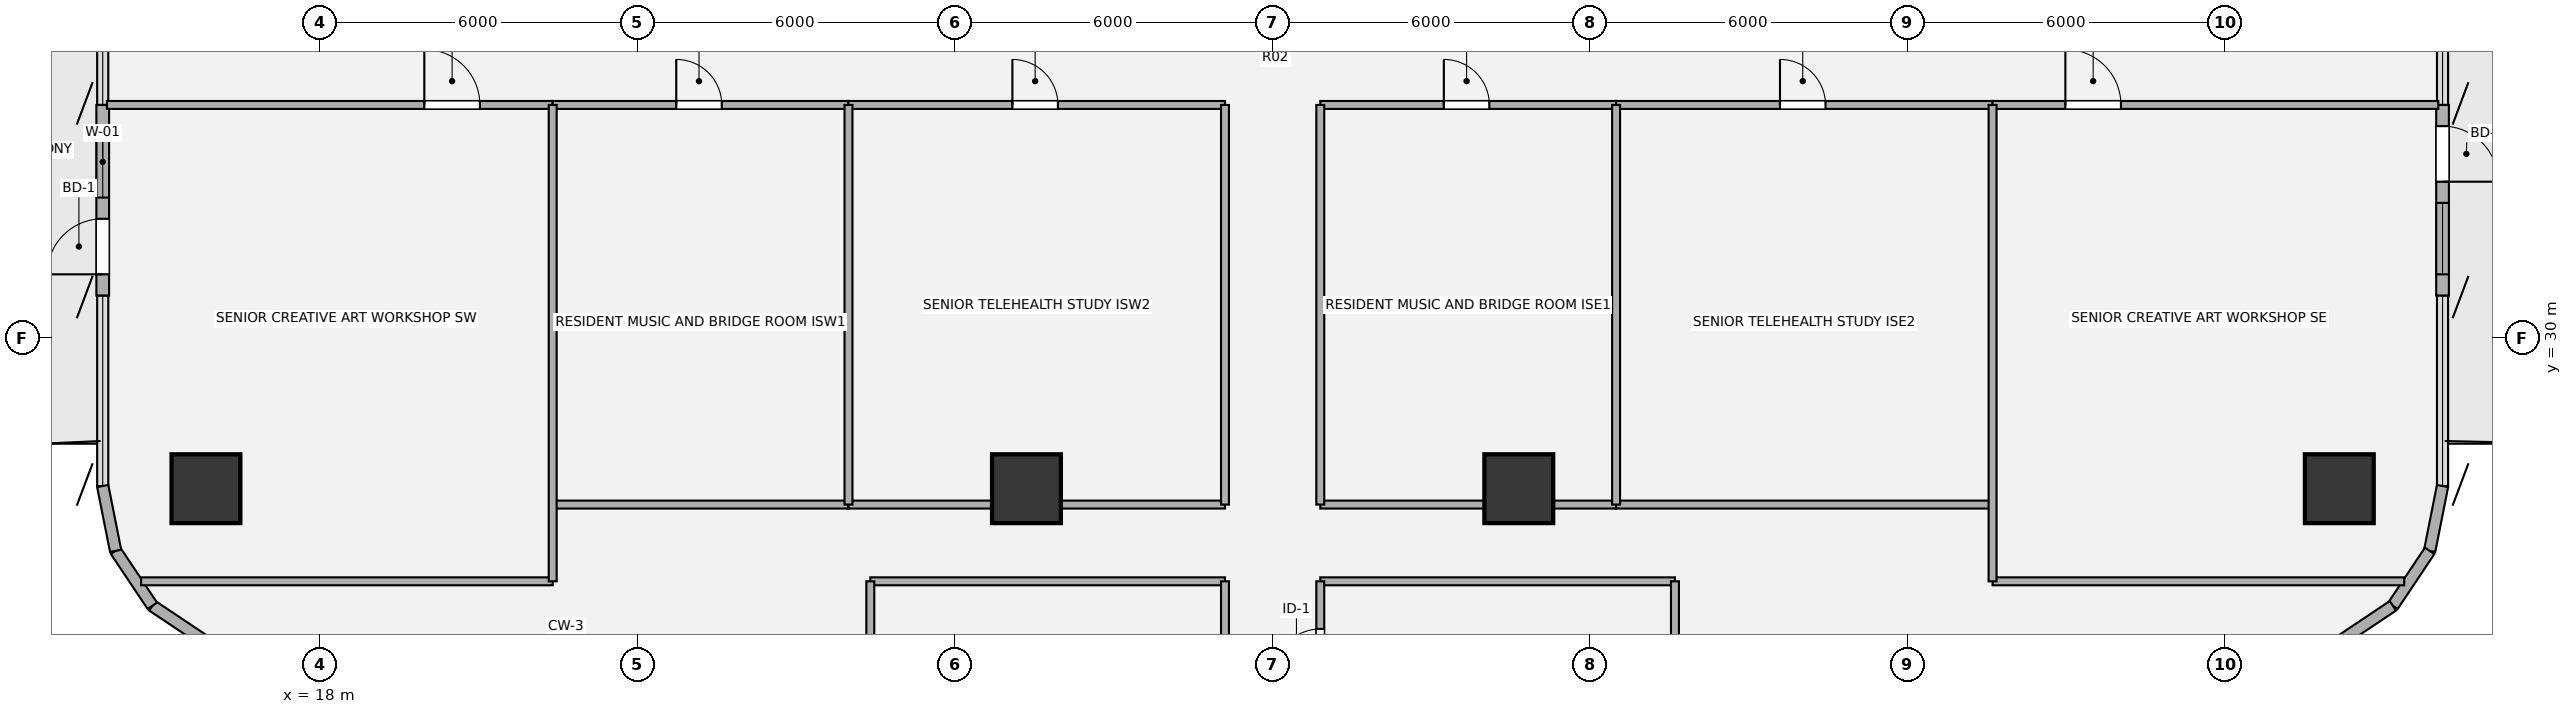
"""IFC4 building model, lengths in metres.
Left out: names, types, materials, properties, quantities, classifications, styles, units other than length and angle.
Written with IfcOpenShell. Run it as: python <this file> out.ifc"""

import sys

from ifc_helpers import new_model, si_unit, direction, frame, frame_2d, origin, origin_2d, place, context, subcontext, project, spatial, rectangle, hollow_circle, extrude, source, transform, mapped, element, fill, save


model = new_model("IFC4")
c1 = context("Model", 3, precision=1e-05, world=origin(), true_north=direction((0.0, 1.0)))
c2 = subcontext(c1, "Body", "Model", "MODEL_VIEW")
j1 = project(units=[si_unit("LENGTHUNIT", "METRE"), si_unit("PLANEANGLEUNIT", "RADIAN")], contexts=[c1])
p1 = place(None, origin())
s1 = spatial("IfcSite", under=j1, at=p1, CompositionType="ELEMENT")
p2 = place(p1, origin())
s2 = spatial("IfcBuilding", under=s1, at=p2, CompositionType="ELEMENT")
p3 = place(p2, frame((0.0, 0.0, 123.84)))
s3 = spatial("IfcBuildingStorey", under=s2, at=p3, CompositionType="ELEMENT", Elevation=123.84)
m1 = source(origin(), c2, "Body", "SweptSolid", [
    extrude(hollow_circle(Radius=0.65, WallThickness=0.045, at=origin_2d()), origin(), (0.0, 0.0, 1.0), 3.78),
])
for number, where, z_axis, x_axis in (
    (1, (15.85, 27.15, 0.0), (0.0, 0.0, 1.0), (1.0, 0.0, 0.0)),
    (2, (56.15, 27.15, 0.0), (0.0, 0.0, 1.0), (1.0, 0.0, 0.0)),
    (3, (31.35, 27.15, 0.0), (0.0, 0.0, 1.0), (1.0, 0.0, 0.0)),
    (4, (40.65, 27.15, 0.0), (0.0, 0.0, 1.0), (1.0, 0.0, 0.0)),
):
    element("IfcColumn", number, at=place(p3, frame(where, z_axis=z_axis, x_axis=x_axis)), inside=s3, PredefinedType="COLUMN", context=c2, shape_type="MappedRepresentation", body=[
        mapped(m1, transform((0.0, 0.0, 0.0), x_axis=(1.0, 0.0, 0.0), y_axis=(0.0, 1.0, 0.0), z_axis=(0.0, 0.0, 1.0), scale=1.0)),
    ])
for number, where, z_axis, x_axis in (
    (5, (15.875, 24.244, 0.0), (0.0, 0.0, 1.0), (-0.831, 0.556, 0.0)),
    (6, (14.837, 24.937, 0.0), (0.0, 0.0, 1.0), (-0.556, 0.831, 0.0)),
    (7, (14.144, 25.975, 0.0), (0.0, 0.0, 1.0), (-0.195, 0.981, 0.0)),
):
    element("IfcWall", number, at=place(p3, frame(where, z_axis=z_axis, x_axis=x_axis)), inside=s3, PredefinedType="SOLIDWALL", context=c2, shape_type="SweptSolid", body=[
        extrude(rectangle(XDim=1.249, YDim=0.215, at=frame_2d((0.624, 0.0))), origin(), (0.0, 0.0, 1.0), 3.53),
    ])
p4 = place(p3, frame((13.9, 30.8, 0.0), z_axis=(0.0, 0.0, 1.0), x_axis=(0.0, 1.0, 0.0)))
e8 = element("IfcWall", 8, at=p4, inside=s3, PredefinedType="SOLIDWALL", context=c2, shape_type="SweptSolid", body=[
    extrude(rectangle(XDim=3.6, YDim=0.24, at=frame_2d((1.8, 0.0))), origin(), (0.0, 0.0, 1.0), 3.53),
])
p5 = place(p4, frame((0.4, 0.0, 0.0)))
e9 = element("IfcOpeningElement", 9, at=p5, cuts=e8, PredefinedType="OPENING", context=c2, shape_type="SweptSolid", body=[
    extrude(rectangle(XDim=1.05, YDim=2.15, at=origin_2d()), frame((0.525, 0.13, 1.075), z_axis=(0.0, -1.0, 0.0), x_axis=(1.0, 0.0, 0.0)), (0.0, 0.0, 1.0), 0.26),
])
p6 = place(p4, frame((1.85, 0.0, 0.85)))
e10 = element("IfcOpeningElement", 10, at=p6, cuts=e8, PredefinedType="OPENING", context=c2, shape_type="SweptSolid", body=[
    extrude(rectangle(XDim=1.35, YDim=1.35, at=origin_2d()), frame((0.675, 0.13, 0.675), z_axis=(0.0, -1.0, 0.0), x_axis=(1.0, 0.0, 0.0)), (0.0, 0.0, 1.0), 0.26),
])
p7 = place(p3, frame((58.1, 34.4, 0.0), z_axis=(0.0, 0.0, 1.0), x_axis=(0.0, -1.0, 0.0)))
e11 = element("IfcWall", 11, at=p7, inside=s3, PredefinedType="SOLIDWALL", context=c2, shape_type="SweptSolid", body=[
    extrude(rectangle(XDim=3.6, YDim=0.24, at=frame_2d((1.8, 0.0))), origin(), (0.0, 0.0, 1.0), 3.53),
])
p8 = place(p7, frame((0.4, 0.0, 0.0)))
e12 = element("IfcOpeningElement", 12, at=p8, cuts=e11, PredefinedType="OPENING", context=c2, shape_type="SweptSolid", body=[
    extrude(rectangle(XDim=1.05, YDim=2.15, at=origin_2d()), frame((0.525, 0.13, 1.075), z_axis=(0.0, -1.0, 0.0), x_axis=(1.0, 0.0, 0.0)), (0.0, 0.0, 1.0), 0.26),
])
p9 = place(p7, frame((1.85, 0.0, 0.85)))
e13 = element("IfcOpeningElement", 13, at=p9, cuts=e11, PredefinedType="OPENING", context=c2, shape_type="SweptSolid", body=[
    extrude(rectangle(XDim=1.35, YDim=1.35, at=origin_2d()), frame((0.675, 0.13, 0.675), z_axis=(0.0, -1.0, 0.0), x_axis=(1.0, 0.0, 0.0)), (0.0, 0.0, 1.0), 0.26),
])
for number, where, z_axis, x_axis in (
    (14, (58.1, 27.2, 0.0), (0.0, 0.0, 1.0), (-0.195, -0.981, 0.0)),
    (15, (57.856, 25.975, 0.0), (0.0, 0.0, 1.0), (-0.556, -0.831, 0.0)),
    (16, (57.163, 24.937, 0.0), (0.0, 0.0, 1.0), (-0.831, -0.556, 0.0)),
):
    element("IfcWall", number, at=place(p3, frame(where, z_axis=z_axis, x_axis=x_axis)), inside=s3, PredefinedType="SOLIDWALL", context=c2, shape_type="SweptSolid", body=[
        extrude(rectangle(XDim=1.249, YDim=0.215, at=frame_2d((0.624, 0.0))), origin(), (0.0, 0.0, 1.0), 3.53),
    ])
p10 = place(p3, frame((14.624, 25.4, 0.0), z_axis=(0.0, 0.0, 1.0), x_axis=(1.0, 0.0, 0.0)))
e17 = element("IfcWall", 17, at=p10, inside=s3, PredefinedType="PARTITIONING", context=c2, shape_type="SweptSolid", body=[
    extrude(rectangle(XDim=7.776, YDim=0.15, at=frame_2d((3.888, 0.0))), origin(), (0.0, 0.0, 1.0), 3.5),
])
for number, where, z_axis, x_axis in (
    (18, (28.4, 25.4, 0.0), (0.0, 0.0, 1.0), (1.0, 0.0, 0.0)),
    (19, (36.9, 25.4, 0.0), (0.0, 0.0, 1.0), (1.0, 0.0, 0.0)),
):
    element("IfcWall", number, at=place(p3, frame(where, z_axis=z_axis, x_axis=x_axis)), inside=s3, PredefinedType="PARTITIONING", context=c2, shape_type="SweptSolid", body=[
        extrude(rectangle(XDim=6.7, YDim=0.15, at=frame_2d((3.35, 0.0))), origin(), (0.0, 0.0, 1.0), 3.5),
    ])
p11 = place(p3, frame((49.6, 25.4, 0.0), z_axis=(0.0, 0.0, 1.0), x_axis=(1.0, 0.0, 0.0)))
e20 = element("IfcWall", 20, at=p11, inside=s3, PredefinedType="PARTITIONING", context=c2, shape_type="SweptSolid", body=[
    extrude(rectangle(XDim=7.776, YDim=0.15, at=frame_2d((3.888, 0.0))), origin(), (0.0, 0.0, 1.0), 3.5),
])
p12 = place(p3, frame((22.4, 26.85, 0.0), z_axis=(0.0, 0.0, 1.0), x_axis=(1.0, 0.0, 0.0)))
e21 = element("IfcWall", 21, at=p12, inside=s3, PredefinedType="PARTITIONING", context=c2, shape_type="SweptSolid", body=[
    extrude(rectangle(XDim=5.588, YDim=0.15, at=frame_2d((2.794, 0.0))), origin(), (0.0, 0.0, 1.0), 3.055),
])
p13 = place(p3, frame((27.988, 26.85, 0.0), z_axis=(0.0, 0.0, 1.0), x_axis=(1.0, 0.0, 0.0)))
e22 = element("IfcWall", 22, at=p13, inside=s3, PredefinedType="PARTITIONING", context=c2, shape_type="SweptSolid", body=[
    extrude(rectangle(XDim=7.112, YDim=0.15, at=frame_2d((3.556, 0.0))), origin(), (0.0, 0.0, 1.0), 2.903),
])
p14 = place(p3, frame((36.9, 26.85, 0.0), z_axis=(0.0, 0.0, 1.0), x_axis=(1.0, 0.0, 0.0)))
e23 = element("IfcWall", 23, at=p14, inside=s3, PredefinedType="PARTITIONING", context=c2, shape_type="SweptSolid", body=[
    extrude(rectangle(XDim=5.588, YDim=0.15, at=frame_2d((2.794, 0.0))), origin(), (0.0, 0.0, 1.0), 2.903),
])
p15 = place(p3, frame((42.488, 26.85, 0.0), z_axis=(0.0, 0.0, 1.0), x_axis=(1.0, 0.0, 0.0)))
e24 = element("IfcWall", 24, at=p15, inside=s3, PredefinedType="PARTITIONING", context=c2, shape_type="SweptSolid", body=[
    extrude(rectangle(XDim=7.112, YDim=0.15, at=frame_2d((3.556, 0.0))), origin(), (0.0, 0.0, 1.0), 3.055),
])
p16 = place(p3, frame((13.98, 34.4, 0.0), z_axis=(0.0, 0.0, 1.0), x_axis=(1.0, 0.0, 0.0)))
e25 = element("IfcWall", 25, at=p16, inside=s3, PredefinedType="PARTITIONING", context=c2, shape_type="SweptSolid", body=[
    extrude(rectangle(XDim=8.42, YDim=0.15, at=frame_2d((4.21, 0.0))), origin(), (0.0, 0.0, 1.0), 2.982),
])
p17 = place(p16, frame((5.995, 0.0, 0.0)))
e26 = element("IfcOpeningElement", 26, at=p17, cuts=e25, PredefinedType="OPENING", context=c2, shape_type="SweptSolid", body=[
    extrude(rectangle(XDim=1.05, YDim=2.1, at=origin_2d()), frame((0.525, 0.085, 1.05), z_axis=(0.0, -1.0, 0.0), x_axis=(1.0, 0.0, 0.0)), (0.0, 0.0, 1.0), 0.17),
])
p18 = place(p3, frame((22.4, 34.4, 0.0), z_axis=(0.0, 0.0, 1.0), x_axis=(1.0, 0.0, 0.0)))
e27 = element("IfcWall", 27, at=p18, inside=s3, PredefinedType="PARTITIONING", context=c2, shape_type="SweptSolid", body=[
    extrude(rectangle(XDim=5.588, YDim=0.15, at=frame_2d((2.794, 0.0))), origin(), (0.0, 0.0, 1.0), 2.982),
])
p19 = place(p18, frame((2.334, 0.0, 0.0)))
e28 = element("IfcOpeningElement", 28, at=p19, cuts=e27, PredefinedType="OPENING", context=c2, shape_type="SweptSolid", body=[
    extrude(rectangle(XDim=0.86, YDim=2.1, at=origin_2d()), frame((0.43, 0.085, 1.05), z_axis=(0.0, -1.0, 0.0), x_axis=(1.0, 0.0, 0.0)), (0.0, 0.0, 1.0), 0.17),
])
p20 = place(p3, frame((27.988, 34.4, 0.0), z_axis=(0.0, 0.0, 1.0), x_axis=(1.0, 0.0, 0.0)))
e29 = element("IfcWall", 29, at=p20, inside=s3, PredefinedType="PARTITIONING", context=c2, shape_type="SweptSolid", body=[
    extrude(rectangle(XDim=7.112, YDim=0.15, at=frame_2d((3.556, 0.0))), origin(), (0.0, 0.0, 1.0), 2.982),
])
p21 = place(p20, frame((3.096, 0.0, 0.0)))
e30 = element("IfcOpeningElement", 30, at=p21, cuts=e29, PredefinedType="OPENING", context=c2, shape_type="SweptSolid", body=[
    extrude(rectangle(XDim=0.86, YDim=2.1, at=origin_2d()), frame((0.43, 0.085, 1.05), z_axis=(0.0, -1.0, 0.0), x_axis=(1.0, 0.0, 0.0)), (0.0, 0.0, 1.0), 0.17),
])
p22 = place(p3, frame((36.9, 34.4, 0.0), z_axis=(0.0, 0.0, 1.0), x_axis=(1.0, 0.0, 0.0)))
e31 = element("IfcWall", 31, at=p22, inside=s3, PredefinedType="PARTITIONING", context=c2, shape_type="SweptSolid", body=[
    extrude(rectangle(XDim=5.588, YDim=0.15, at=frame_2d((2.794, 0.0))), origin(), (0.0, 0.0, 1.0), 2.982),
])
p23 = place(p22, frame((2.334, 0.0, 0.0)))
e32 = element("IfcOpeningElement", 32, at=p23, cuts=e31, PredefinedType="OPENING", context=c2, shape_type="SweptSolid", body=[
    extrude(rectangle(XDim=0.86, YDim=2.1, at=origin_2d()), frame((0.43, 0.085, 1.05), z_axis=(0.0, -1.0, 0.0), x_axis=(1.0, 0.0, 0.0)), (0.0, 0.0, 1.0), 0.17),
])
p24 = place(p3, frame((42.488, 34.4, 0.0), z_axis=(0.0, 0.0, 1.0), x_axis=(1.0, 0.0, 0.0)))
e33 = element("IfcWall", 33, at=p24, inside=s3, PredefinedType="PARTITIONING", context=c2, shape_type="SweptSolid", body=[
    extrude(rectangle(XDim=7.112, YDim=0.15, at=frame_2d((3.556, 0.0))), origin(), (0.0, 0.0, 1.0), 2.982),
])
p25 = place(p24, frame((3.096, 0.0, 0.0)))
e34 = element("IfcOpeningElement", 34, at=p25, cuts=e33, PredefinedType="OPENING", context=c2, shape_type="SweptSolid", body=[
    extrude(rectangle(XDim=0.86, YDim=2.1, at=origin_2d()), frame((0.43, 0.085, 1.05), z_axis=(0.0, -1.0, 0.0), x_axis=(1.0, 0.0, 0.0)), (0.0, 0.0, 1.0), 0.17),
])
p26 = place(p3, frame((49.6, 34.4, 0.0), z_axis=(0.0, 0.0, 1.0), x_axis=(1.0, 0.0, 0.0)))
e35 = element("IfcWall", 35, at=p26, inside=s3, PredefinedType="PARTITIONING", context=c2, shape_type="SweptSolid", body=[
    extrude(rectangle(XDim=8.42, YDim=0.15, at=frame_2d((4.21, 0.0))), origin(), (0.0, 0.0, 1.0), 2.982),
])
p27 = place(p26, frame((1.375, 0.0, 0.0)))
e36 = element("IfcOpeningElement", 36, at=p27, cuts=e35, PredefinedType="OPENING", context=c2, shape_type="SweptSolid", body=[
    extrude(rectangle(XDim=1.05, YDim=2.1, at=origin_2d()), frame((0.525, 0.085, 1.05), z_axis=(0.0, -1.0, 0.0), x_axis=(1.0, 0.0, 0.0)), (0.0, 0.0, 1.0), 0.17),
])
p28 = place(p3, frame((22.4, 25.4, 0.0), z_axis=(0.0, 0.0, 1.0), x_axis=(0.0, 1.0, 0.0)))
e37 = element("IfcWall", 37, at=p28, inside=s3, PredefinedType="PARTITIONING", context=c2, shape_type="SweptSolid", body=[
    extrude(rectangle(XDim=9.0, YDim=0.15, at=frame_2d((4.5, 0.0))), origin(), (0.0, 0.0, 1.0), 3.5),
])
p29 = place(p3, frame((27.988, 26.85, 0.0), z_axis=(0.0, 0.0, 1.0), x_axis=(0.0, 1.0, 0.0)))
e38 = element("IfcWall", 38, at=p29, inside=s3, PredefinedType="PARTITIONING", context=c2, shape_type="SweptSolid", body=[
    extrude(rectangle(XDim=7.55, YDim=0.15, at=frame_2d((3.775, 0.0))), origin(), (0.0, 0.0, 1.0), 3.5),
])
p30 = place(p3, frame((28.4, 21.957, 0.0), z_axis=(0.0, 0.0, 1.0), x_axis=(0.0, 1.0, 0.0)))
e39 = element("IfcWall", 39, at=p30, inside=s3, PredefinedType="PARTITIONING", context=c2, shape_type="SweptSolid", body=[
    extrude(rectangle(XDim=3.443, YDim=0.15, at=frame_2d((1.721, 0.0))), origin(), (0.0, 0.0, 1.0), 3.5),
])
p31 = place(p3, frame((35.1, 20.2, 0.0), z_axis=(0.0, 0.0, 1.0), x_axis=(0.0, 1.0, 0.0)))
e40 = element("IfcWall", 40, at=p31, inside=s3, PredefinedType="PARTITIONING", context=c2, shape_type="SweptSolid", body=[
    extrude(rectangle(XDim=5.2, YDim=0.15, at=frame_2d((2.6, 0.0))), origin(), (0.0, 0.0, 1.0), 3.5),
])
p32 = place(p31, frame((2.175, 0.0, 0.0)))
e41 = element("IfcOpeningElement", 41, at=p32, cuts=e40, PredefinedType="OPENING", context=c2, shape_type="SweptSolid", body=[
    extrude(rectangle(XDim=1.05, YDim=2.1, at=origin_2d()), frame((0.525, 0.085, 1.05), z_axis=(0.0, -1.0, 0.0), x_axis=(1.0, 0.0, 0.0)), (0.0, 0.0, 1.0), 0.17),
])
p33 = place(p3, frame((35.1, 26.85, 0.0), z_axis=(0.0, 0.0, 1.0), x_axis=(0.0, 1.0, 0.0)))
e42 = element("IfcWall", 42, at=p33, inside=s3, PredefinedType="PARTITIONING", context=c2, shape_type="SweptSolid", body=[
    extrude(rectangle(XDim=7.55, YDim=0.15, at=frame_2d((3.775, 0.0))), origin(), (0.0, 0.0, 1.0), 3.5),
])
p34 = place(p3, frame((36.9, 22.8, 0.0), z_axis=(0.0, 0.0, 1.0), x_axis=(0.0, 1.0, 0.0)))
e43 = element("IfcWall", 43, at=p34, inside=s3, PredefinedType="PARTITIONING", context=c2, shape_type="SweptSolid", body=[
    extrude(rectangle(XDim=2.6, YDim=0.15, at=frame_2d((1.3, 0.0))), origin(), (0.0, 0.0, 1.0), 3.5),
])
p35 = place(p34, frame((0.84, 0.0, 0.0)))
e44 = element("IfcOpeningElement", 44, at=p35, cuts=e43, PredefinedType="OPENING", context=c2, shape_type="SweptSolid", body=[
    extrude(rectangle(XDim=0.86, YDim=2.1, at=origin_2d()), frame((0.43, 0.085, 1.05), z_axis=(0.0, -1.0, 0.0), x_axis=(1.0, 0.0, 0.0)), (0.0, 0.0, 1.0), 0.17),
])
for number, where, z_axis, x_axis in (
    (45, (36.9, 26.85, 0.0), (0.0, 0.0, 1.0), (0.0, 1.0, 0.0)),
    (46, (42.488, 26.85, 0.0), (0.0, 0.0, 1.0), (0.0, 1.0, 0.0)),
):
    element("IfcWall", number, at=place(p3, frame(where, z_axis=z_axis, x_axis=x_axis)), inside=s3, PredefinedType="PARTITIONING", context=c2, shape_type="SweptSolid", body=[
        extrude(rectangle(XDim=7.55, YDim=0.15, at=frame_2d((3.775, 0.0))), origin(), (0.0, 0.0, 1.0), 3.5),
    ])
p36 = place(p3, frame((43.6, 21.958, 0.0), z_axis=(0.0, 0.0, 1.0), x_axis=(0.0, 1.0, 0.0)))
e47 = element("IfcWall", 47, at=p36, inside=s3, PredefinedType="PARTITIONING", context=c2, shape_type="SweptSolid", body=[
    extrude(rectangle(XDim=3.442, YDim=0.15, at=frame_2d((1.721, 0.0))), origin(), (0.0, 0.0, 1.0), 3.5),
])
p37 = place(p3, frame((49.6, 25.4, 0.0), z_axis=(0.0, 0.0, 1.0), x_axis=(0.0, 1.0, 0.0)))
e48 = element("IfcWall", 48, at=p37, inside=s3, PredefinedType="PARTITIONING", context=c2, shape_type="SweptSolid", body=[
    extrude(rectangle(XDim=9.0, YDim=0.15, at=frame_2d((4.5, 0.0))), origin(), (0.0, 0.0, 1.0), 3.5),
])
m2 = source(origin(), c2, "Body", "SweptSolid", [
    extrude(rectangle(XDim=1.05, YDim=2.15, at=origin_2d()), frame((0.525, 0.025, 1.075), z_axis=(0.0, -1.0, 0.0), x_axis=(1.0, 0.0, 0.0)), (0.0, 0.0, 1.0), 0.05),
])
p38 = place(p5, origin())
e49 = element("IfcDoor", 49, at=p38, inside=s3, OperationType="SINGLE_SWING_LEFT", PredefinedType="DOOR", context=c2, shape_type="MappedRepresentation", body=[
    mapped(m2, transform((0.0, 0.0, 0.0), x_axis=(1.0, 0.0, 0.0), y_axis=(0.0, 1.0, 0.0), z_axis=(0.0, 0.0, 1.0), scale=1.0)),
])
fill(e9, e49)
m3 = source(origin(), c2, "Body", "SweptSolid", [
    extrude(rectangle(XDim=1.35, YDim=1.35, at=origin_2d()), frame((0.675, 0.03, 0.675), z_axis=(0.0, -1.0, 0.0), x_axis=(1.0, 0.0, 0.0)), (0.0, 0.0, 1.0), 0.06),
])
p39 = place(p6, origin())
e50 = element("IfcWindow", 50, at=p39, inside=s3, PartitioningType="SINGLE_PANEL", PredefinedType="WINDOW", context=c2, shape_type="MappedRepresentation", body=[
    mapped(m3, transform((0.0, 0.0, 0.0), x_axis=(1.0, 0.0, 0.0), y_axis=(0.0, 1.0, 0.0), z_axis=(0.0, 0.0, 1.0), scale=1.0)),
])
fill(e10, e50)
p40 = place(p8, origin())
e51 = element("IfcDoor", 51, at=p40, inside=s3, OperationType="SINGLE_SWING_RIGHT", PredefinedType="DOOR", context=c2, shape_type="MappedRepresentation", body=[
    mapped(m2, transform((0.0, 0.0, 0.0), x_axis=(1.0, 0.0, 0.0), y_axis=(0.0, 1.0, 0.0), z_axis=(0.0, 0.0, 1.0), scale=1.0)),
])
fill(e12, e51)
p41 = place(p9, origin())
e52 = element("IfcWindow", 52, at=p41, inside=s3, PartitioningType="SINGLE_PANEL", PredefinedType="WINDOW", context=c2, shape_type="MappedRepresentation", body=[
    mapped(m3, transform((0.0, 0.0, 0.0), x_axis=(1.0, 0.0, 0.0), y_axis=(0.0, 1.0, 0.0), z_axis=(0.0, 0.0, 1.0), scale=1.0)),
])
fill(e13, e52)
m4 = source(origin(), c2, "Body", "SweptSolid", [
    extrude(rectangle(XDim=1.05, YDim=2.1, at=origin_2d()), frame((0.525, 0.025, 1.05), z_axis=(0.0, -1.0, 0.0), x_axis=(1.0, 0.0, 0.0)), (0.0, 0.0, 1.0), 0.05),
])
p42 = place(p17, origin())
e53 = element("IfcDoor", 53, at=p42, inside=s3, OperationType="SINGLE_SWING_LEFT", PredefinedType="DOOR", context=c2, shape_type="MappedRepresentation", body=[
    mapped(m4, transform((0.0, 0.0, 0.0), x_axis=(1.0, 0.0, 0.0), y_axis=(0.0, 1.0, 0.0), z_axis=(0.0, 0.0, 1.0), scale=1.0)),
])
fill(e26, e53)
m5 = source(origin(), c2, "Body", "SweptSolid", [
    extrude(rectangle(XDim=0.86, YDim=2.1, at=origin_2d()), frame((0.43, 0.025, 1.05), z_axis=(0.0, -1.0, 0.0), x_axis=(1.0, 0.0, 0.0)), (0.0, 0.0, 1.0), 0.05),
])
p43 = place(p19, origin())
e54 = element("IfcDoor", 54, at=p43, inside=s3, OperationType="SINGLE_SWING_LEFT", PredefinedType="DOOR", context=c2, shape_type="MappedRepresentation", body=[
    mapped(m5, transform((0.0, 0.0, 0.0), x_axis=(1.0, 0.0, 0.0), y_axis=(0.0, 1.0, 0.0), z_axis=(0.0, 0.0, 1.0), scale=1.0)),
])
fill(e28, e54)
p44 = place(p21, origin())
e55 = element("IfcDoor", 55, at=p44, inside=s3, OperationType="SINGLE_SWING_LEFT", PredefinedType="DOOR", context=c2, shape_type="MappedRepresentation", body=[
    mapped(m5, transform((0.0, 0.0, 0.0), x_axis=(1.0, 0.0, 0.0), y_axis=(0.0, 1.0, 0.0), z_axis=(0.0, 0.0, 1.0), scale=1.0)),
])
fill(e30, e55)
p45 = place(p23, origin())
e56 = element("IfcDoor", 56, at=p45, inside=s3, OperationType="SINGLE_SWING_LEFT", PredefinedType="DOOR", context=c2, shape_type="MappedRepresentation", body=[
    mapped(m5, transform((0.0, 0.0, 0.0), x_axis=(1.0, 0.0, 0.0), y_axis=(0.0, 1.0, 0.0), z_axis=(0.0, 0.0, 1.0), scale=1.0)),
])
fill(e32, e56)
p46 = place(p25, origin())
e57 = element("IfcDoor", 57, at=p46, inside=s3, OperationType="SINGLE_SWING_LEFT", PredefinedType="DOOR", context=c2, shape_type="MappedRepresentation", body=[
    mapped(m5, transform((0.0, 0.0, 0.0), x_axis=(1.0, 0.0, 0.0), y_axis=(0.0, 1.0, 0.0), z_axis=(0.0, 0.0, 1.0), scale=1.0)),
])
fill(e34, e57)
p47 = place(p27, origin())
e58 = element("IfcDoor", 58, at=p47, inside=s3, OperationType="SINGLE_SWING_LEFT", PredefinedType="DOOR", context=c2, shape_type="MappedRepresentation", body=[
    mapped(m4, transform((0.0, 0.0, 0.0), x_axis=(1.0, 0.0, 0.0), y_axis=(0.0, 1.0, 0.0), z_axis=(0.0, 0.0, 1.0), scale=1.0)),
])
fill(e36, e58)
p48 = place(p35, origin())
e59 = element("IfcDoor", 59, at=p48, inside=s3, OperationType="SINGLE_SWING_LEFT", PredefinedType="DOOR", context=c2, shape_type="MappedRepresentation", body=[
    mapped(m5, transform((0.0, 0.0, 0.0), x_axis=(1.0, 0.0, 0.0), y_axis=(0.0, 1.0, 0.0), z_axis=(0.0, 0.0, 1.0), scale=1.0)),
])
fill(e44, e59)
save(model, sys.argv[1])
